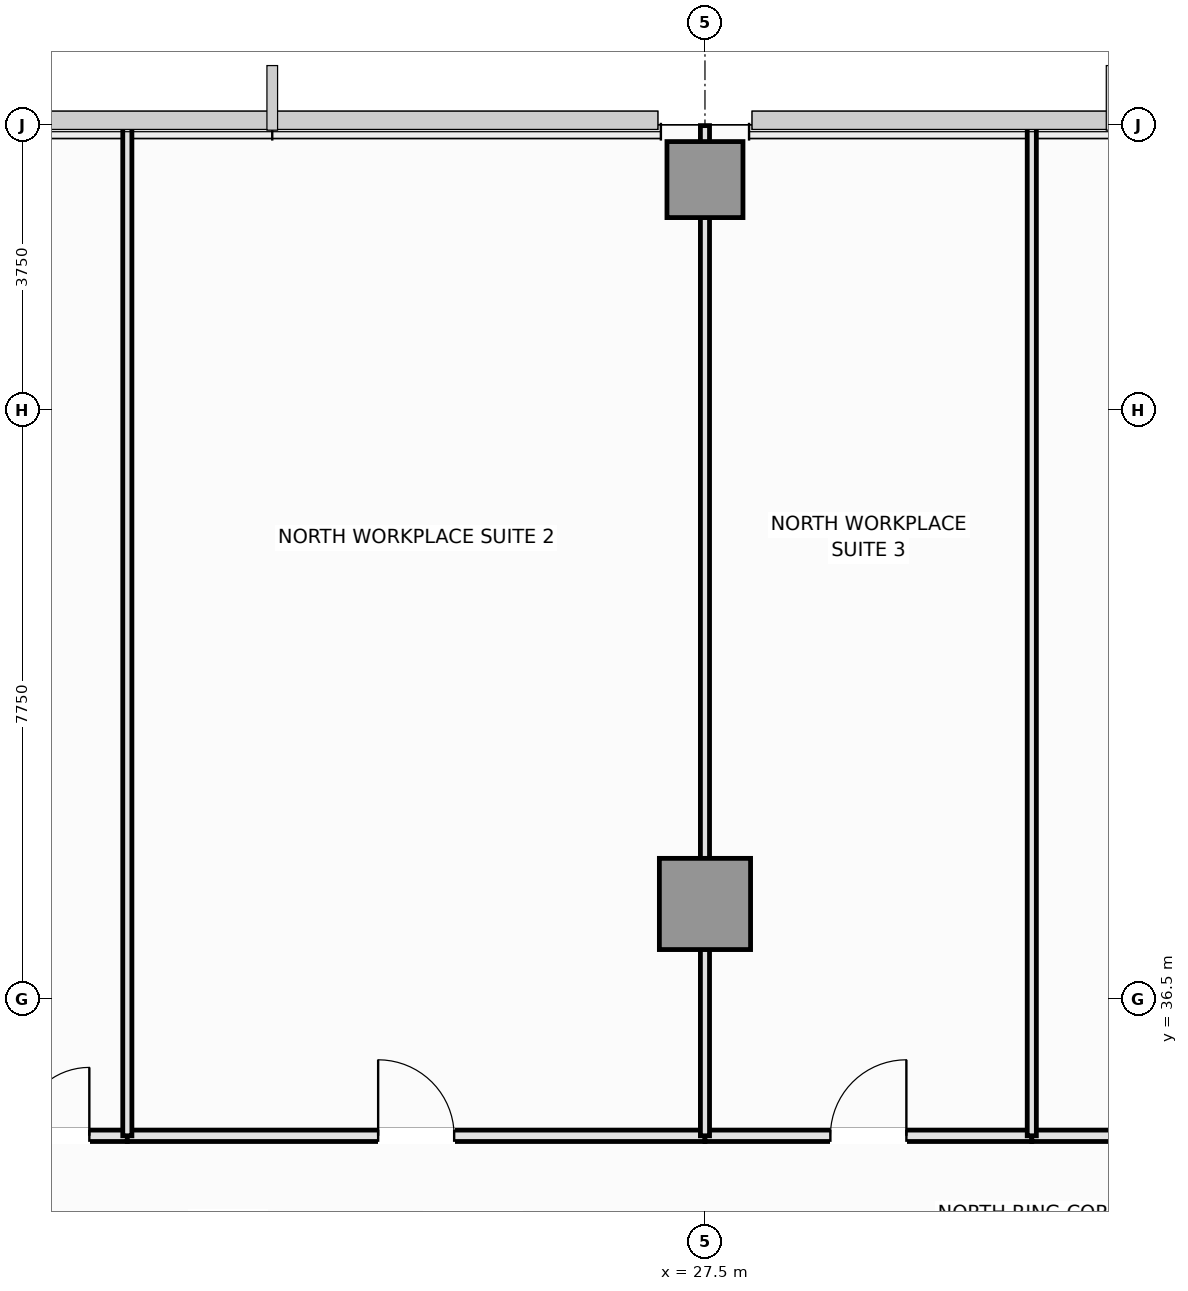
"""IFC4 building model, lengths in metres.
Left out: names, types, materials, properties, quantities, classifications, styles, units other than length and angle.
Written with IfcOpenShell. Run it as: python <this file> out.ifc"""

import sys

from ifc_helpers import new_model, si_unit, direction, frame, frame_2d, origin, origin_2d, place, context, subcontext, project, spatial, rectangle, extrude, element, fill, save


model = new_model("IFC4")
c1 = context("Model", 3, precision=1e-05, world=origin(), true_north=direction((0.0, 1.0)))
c2 = subcontext(c1, "Body", "Model", "MODEL_VIEW")
j1 = project(units=[si_unit("LENGTHUNIT", "METRE"), si_unit("PLANEANGLEUNIT", "RADIAN")], contexts=[c1])
p1 = place(None, origin())
s1 = spatial("IfcSite", under=j1, at=p1, CompositionType="ELEMENT")
p2 = place(p1, origin())
s2 = spatial("IfcBuilding", under=s1, at=p2, CompositionType="ELEMENT")
p3 = place(p2, frame((0.0, 0.0, 68.2)))
s3 = spatial("IfcBuildingStorey", under=s2, at=p3, CompositionType="ELEMENT", Elevation=68.2)
p4 = place(p3, frame((27.5, 37.75, 0.0), z_axis=(0.0, 0.0, 1.0), x_axis=(1.0, 0.0, 0.0)))
e1 = element("IfcColumn", 1, at=p4, inside=s3, PredefinedType="COLUMN", context=c2, shape_type="SweptSolid", body=[
    extrude(rectangle(XDim=1.2, YDim=1.2, at=origin_2d()), origin(), (0.0, 0.0, 1.0), 3.55),
])
p5 = place(p3, frame((27.5, 47.28, 0.0), z_axis=(0.0, 0.0, 1.0), x_axis=(1.0, 0.0, 0.0)))
e2 = element("IfcColumn", 2, at=p5, inside=s3, PredefinedType="COLUMN", context=c2, shape_type="SweptSolid", body=[
    extrude(rectangle(XDim=1.0, YDim=1.0, at=origin_2d()), origin(), (0.0, 0.0, 1.0), 3.55),
])
p6 = place(p3, frame((18.0, 34.7, 0.0), z_axis=(0.0, 0.0, 1.0), x_axis=(1.0, 0.0, 0.0)))
e3 = element("IfcWall", 3, at=p6, inside=s3, PredefinedType="PARTITIONING", context=c2, shape_type="SweptSolid", body=[
    extrude(rectangle(XDim=1.9, YDim=0.15, at=frame_2d((0.95, 0.0))), origin(), (0.0, 0.0, 1.0), 3.37),
])
p7 = place(p6, frame((0.5, 0.0, 0.0)))
e4 = element("IfcOpeningElement", 4, at=p7, cuts=e3, PredefinedType="OPENING", context=c2, shape_type="SweptSolid", body=[
    extrude(rectangle(XDim=0.9, YDim=2.1, at=frame_2d((0.45, 1.05))), frame((0.0, 0.085, 0.0), z_axis=(0.0, -1.0, 0.0), x_axis=(1.0, 0.0, 0.0)), (0.0, 0.0, 1.0), 0.17),
])
p8 = place(p3, frame((19.9, 34.7, 0.0), z_axis=(0.0, 0.0, 1.0), x_axis=(1.0, 0.0, 0.0)))
e5 = element("IfcWall", 5, at=p8, inside=s3, PredefinedType="PARTITIONING", context=c2, shape_type="SweptSolid", body=[
    extrude(rectangle(XDim=7.6, YDim=0.15, at=frame_2d((3.8, 0.0))), origin(), (0.0, 0.0, 1.0), 3.37),
])
p9 = place(p8, frame((3.3, 0.0, 0.0)))
e6 = element("IfcOpeningElement", 6, at=p9, cuts=e5, PredefinedType="OPENING", context=c2, shape_type="SweptSolid", body=[
    extrude(rectangle(XDim=1.0, YDim=2.15, at=frame_2d((0.5, 1.075))), frame((0.0, 0.085, 0.0), z_axis=(0.0, -1.0, 0.0), x_axis=(1.0, 0.0, 0.0)), (0.0, 0.0, 1.0), 0.17),
])
p10 = place(p3, frame((27.5, 34.7, 0.0), z_axis=(0.0, 0.0, 1.0), x_axis=(1.0, 0.0, 0.0)))
e7 = element("IfcWall", 7, at=p10, inside=s3, PredefinedType="PARTITIONING", context=c2, shape_type="SweptSolid", body=[
    extrude(rectangle(XDim=4.3, YDim=0.15, at=frame_2d((2.15, 0.0))), origin(), (0.0, 0.0, 1.0), 3.37),
])
p11 = place(p10, frame((1.65, 0.0, 0.0)))
e8 = element("IfcOpeningElement", 8, at=p11, cuts=e7, PredefinedType="OPENING", context=c2, shape_type="SweptSolid", body=[
    extrude(rectangle(XDim=1.0, YDim=2.15, at=frame_2d((0.5, 1.075))), frame((0.0, 0.085, 0.0), z_axis=(0.0, -1.0, 0.0), x_axis=(1.0, 0.0, 0.0)), (0.0, 0.0, 1.0), 0.17),
])
p12 = place(p3, frame((31.8, 34.7, 0.0), z_axis=(0.0, 0.0, 1.0), x_axis=(1.0, 0.0, 0.0)))
e9 = element("IfcWall", 9, at=p12, inside=s3, PredefinedType="PARTITIONING", context=c2, shape_type="SweptSolid", body=[
    extrude(rectangle(XDim=4.9, YDim=0.15, at=frame_2d((2.45, 0.0))), origin(), (0.0, 0.0, 1.0), 3.37),
])
p13 = place(p12, frame((1.95, 0.0, 0.0)))
e10 = element("IfcOpeningElement", 10, at=p13, cuts=e9, PredefinedType="OPENING", context=c2, shape_type="SweptSolid", body=[
    extrude(rectangle(XDim=1.0, YDim=2.15, at=frame_2d((0.5, 1.075))), frame((0.0, 0.085, 0.0), z_axis=(0.0, -1.0, 0.0), x_axis=(1.0, 0.0, 0.0)), (0.0, 0.0, 1.0), 0.17),
])
p14 = place(p3, frame((19.9, 34.7, 0.0), z_axis=(0.0, 0.0, 1.0), x_axis=(0.0, 1.0, 0.0)))
e11 = element("IfcWall", 11, at=p14, inside=s3, PredefinedType="PARTITIONING", context=c2, shape_type="SweptSolid", body=[
    extrude(rectangle(XDim=13.29, YDim=0.12, at=frame_2d((6.645, 0.0))), origin(), (0.0, 0.0, 1.0), 3.37),
])
p15 = place(p3, frame((27.5, 34.7, 0.0), z_axis=(0.0, 0.0, 1.0), x_axis=(0.0, 1.0, 0.0)))
e12 = element("IfcWall", 12, at=p15, inside=s3, PredefinedType="PARTITIONING", context=c2, shape_type="SweptSolid", body=[
    extrude(rectangle(XDim=13.29, YDim=0.12, at=frame_2d((6.645, 0.0))), origin(), (0.0, 0.0, 1.0), 2.82),
])
p16 = place(p3, frame((31.8, 34.7, 0.0), z_axis=(0.0, 0.0, 1.0), x_axis=(0.0, 1.0, 0.0)))
e13 = element("IfcWall", 13, at=p16, inside=s3, PredefinedType="PARTITIONING", context=c2, shape_type="SweptSolid", body=[
    extrude(rectangle(XDim=13.29, YDim=0.12, at=frame_2d((6.645, 0.0))), origin(), (0.0, 0.0, 1.0), 3.37),
])
p17 = place(p7, origin())
e14 = element("IfcDoor", 14, at=p17, inside=s3, OperationType="SINGLE_SWING_RIGHT", PredefinedType="DOOR", context=c2, shape_type="SweptSolid", body=[
    extrude(rectangle(XDim=0.9, YDim=2.1, at=frame_2d((0.45, 1.05))), frame((0.0, 0.025, 0.0), z_axis=(0.0, -1.0, 0.0), x_axis=(1.0, 0.0, 0.0)), (0.0, 0.0, 1.0), 0.05),
])
fill(e4, e14)
p18 = place(p9, origin())
e15 = element("IfcDoor", 15, at=p18, inside=s3, OperationType="SINGLE_SWING_LEFT", PredefinedType="DOOR", context=c2, shape_type="SweptSolid", body=[
    extrude(rectangle(XDim=1.0, YDim=2.15, at=frame_2d((0.5, 1.075))), frame((0.0, 0.025, 0.0), z_axis=(0.0, -1.0, 0.0), x_axis=(1.0, 0.0, 0.0)), (0.0, 0.0, 1.0), 0.05),
])
fill(e6, e15)
p19 = place(p11, origin())
e16 = element("IfcDoor", 16, at=p19, inside=s3, OperationType="SINGLE_SWING_RIGHT", PredefinedType="DOOR", context=c2, shape_type="SweptSolid", body=[
    extrude(rectangle(XDim=1.0, YDim=2.15, at=frame_2d((0.5, 1.075))), frame((0.0, 0.025, 0.0), z_axis=(0.0, -1.0, 0.0), x_axis=(1.0, 0.0, 0.0)), (0.0, 0.0, 1.0), 0.05),
])
fill(e8, e16)
save(model, sys.argv[1])
